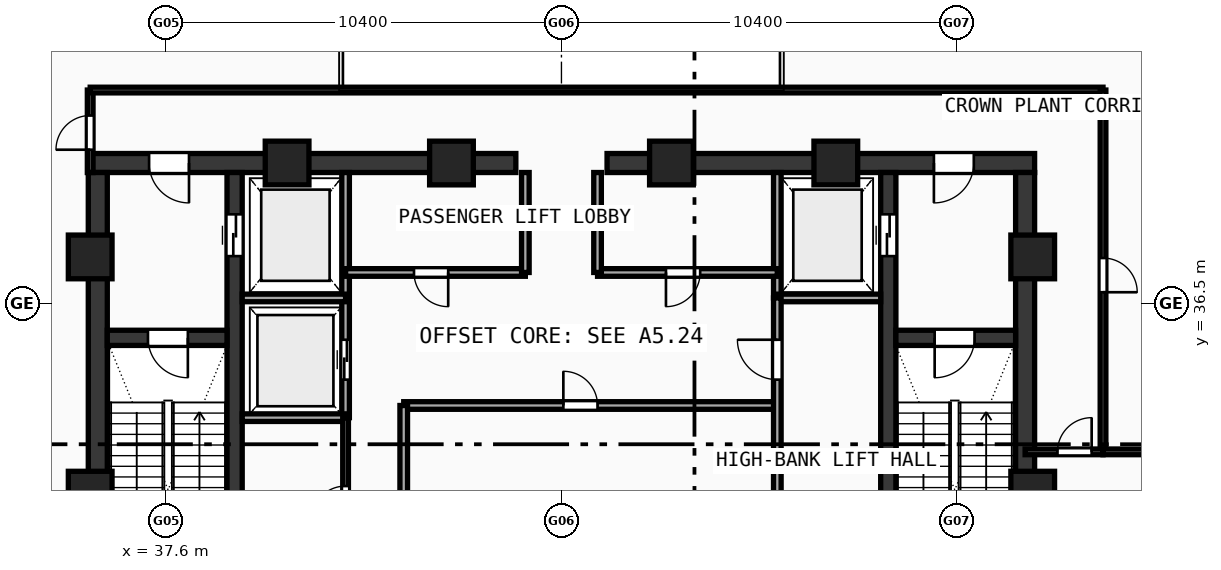
"""IFC4 building model, lengths in metres.
Left out: names, types, materials, properties, quantities, classifications, styles, units other than length and angle.
Written with IfcOpenShell. Run it as: python <this file> out.ifc"""

import sys

from ifc_helpers import new_model, si_unit, direction, frame, frame_2d, origin, origin_with_axes, origin_2d, place, context, subcontext, project, spatial, rectangle, hollow_rectangle, extrude, source, transform, mapped, element, fill, save


model = new_model("IFC4")
c1 = context("Model", 3, precision=1e-05, world=origin(), true_north=direction((0.0, 1.0)))
c2 = subcontext(c1, "Body", "Model", "MODEL_VIEW")
j1 = project(units=[si_unit("LENGTHUNIT", "METRE"), si_unit("PLANEANGLEUNIT", "RADIAN")], contexts=[c1])
p1 = place(None, origin())
s1 = spatial("IfcSite", under=j1, at=p1, CompositionType="ELEMENT")
p2 = place(p1, origin())
s2 = spatial("IfcBuilding", under=s1, at=p2, CompositionType="ELEMENT")
p3 = place(p2, frame((0.0, 0.0, 381.76)))
s3 = spatial("IfcBuildingStorey", under=s2, at=p3, CompositionType="ELEMENT", Elevation=381.76)
p4 = place(p3, frame((35.55, 40.2, 0.0), z_axis=(0.0, 0.0, 1.0), x_axis=(1.0, 0.0, 0.0)))
e1 = element("IfcWall", 1, at=p4, inside=s3, PredefinedType="SHEAR", context=c2, shape_type="SweptSolid", body=[
    extrude(rectangle(XDim=11.25, YDim=0.5, at=frame_2d((5.625, 0.0))), origin(), (0.0, 0.0, 1.0), 4.72),
])
p5 = place(p4, frame((1.6, 0.0, 0.0)))
e2 = element("IfcOpeningElement", 2, at=p5, cuts=e1, PredefinedType="OPENING", context=c2, shape_type="SweptSolid", body=[
    extrude(rectangle(XDim=1.05, YDim=2.1, at=frame_2d((0.525, 1.05))), frame((0.0, 0.26, 0.0), z_axis=(0.0, -1.0, 0.0), x_axis=(1.0, 0.0, 0.0)), (0.0, 0.0, 1.0), 0.52),
])
p6 = place(p3, frame((49.2, 40.2, 0.0), z_axis=(0.0, 0.0, 1.0), x_axis=(1.0, 0.0, 0.0)))
e3 = element("IfcWall", 3, at=p6, inside=s3, PredefinedType="SHEAR", context=c2, shape_type="SweptSolid", body=[
    extrude(rectangle(XDim=11.25, YDim=0.5, at=frame_2d((5.625, 0.0))), origin(), (0.0, 0.0, 1.0), 4.72),
])
p7 = place(p6, frame((8.6, 0.0, 0.0)))
e4 = element("IfcOpeningElement", 4, at=p7, cuts=e3, PredefinedType="OPENING", context=c2, shape_type="SweptSolid", body=[
    extrude(rectangle(XDim=1.05, YDim=2.1, at=frame_2d((0.525, 1.05))), frame((0.0, 0.26, 0.0), z_axis=(0.0, -1.0, 0.0), x_axis=(1.0, 0.0, 0.0)), (0.0, 0.0, 1.0), 0.52),
])
for number, where, z_axis, x_axis in (
    (5, (35.8, 27.75, 0.0), (0.0, 0.0, 1.0), (0.0, 1.0, 0.0)),
    (6, (60.2, 27.75, 0.0), (0.0, 0.0, 1.0), (0.0, 1.0, 0.0)),
):
    element("IfcWall", number, at=place(p3, frame(where, z_axis=z_axis, x_axis=x_axis)), inside=s3, PredefinedType="SHEAR", context=c2, shape_type="SweptSolid", body=[
        extrude(rectangle(XDim=12.2, YDim=0.5, at=frame_2d((6.1, 0.0))), origin(), (0.0, 0.0, 1.0), 4.72),
    ])
p8 = place(p3, frame((39.4, 27.75, 0.0), z_axis=(0.0, 0.0, 1.0), x_axis=(0.0, 1.0, 0.0)))
e7 = element("IfcWall", 7, at=p8, inside=s3, PredefinedType="SHEAR", context=c2, shape_type="SweptSolid", body=[
    extrude(rectangle(XDim=12.2, YDim=0.4, at=frame_2d((6.1, 0.0))), origin(), (0.0, 0.0, 1.0), 4.72),
])
p9 = place(p8, frame((10.0, 0.0, 0.0)))
e8 = element("IfcOpeningElement", 8, at=p9, cuts=e7, PredefinedType="OPENING", context=c2, shape_type="SweptSolid", body=[
    extrude(rectangle(XDim=1.1, YDim=2.1, at=frame_2d((0.55, 1.05))), frame((0.0, 0.21, 0.0), z_axis=(0.0, -1.0, 0.0), x_axis=(1.0, 0.0, 0.0)), (0.0, 0.0, 1.0), 0.42),
])
p10 = place(p3, frame((56.6, 27.75, 0.0), z_axis=(0.0, 0.0, 1.0), x_axis=(0.0, 1.0, 0.0)))
e9 = element("IfcWall", 9, at=p10, inside=s3, PredefinedType="SHEAR", context=c2, shape_type="SweptSolid", body=[
    extrude(rectangle(XDim=12.2, YDim=0.4, at=frame_2d((6.1, 0.0))), origin(), (0.0, 0.0, 1.0), 4.72),
])
p11 = place(p10, frame((10.0, 0.0, 0.0)))
e10 = element("IfcOpeningElement", 10, at=p11, cuts=e9, PredefinedType="OPENING", context=c2, shape_type="SweptSolid", body=[
    extrude(rectangle(XDim=1.1, YDim=2.1, at=frame_2d((0.55, 1.05))), frame((0.0, 0.21, 0.0), z_axis=(0.0, -1.0, 0.0), x_axis=(1.0, 0.0, 0.0)), (0.0, 0.0, 1.0), 0.42),
])
p12 = place(p3, frame((36.05, 35.6, 0.0), z_axis=(0.0, 0.0, 1.0), x_axis=(1.0, 0.0, 0.0)))
e11 = element("IfcWall", 11, at=p12, inside=s3, PredefinedType="SHEAR", context=c2, shape_type="SweptSolid", body=[
    extrude(rectangle(XDim=3.15, YDim=0.4, at=frame_2d((1.575, 0.0))), origin(), (0.0, 0.0, 1.0), 4.72),
])
p13 = place(p12, frame((1.07, 0.0, 0.0)))
e12 = element("IfcOpeningElement", 12, at=p13, cuts=e11, PredefinedType="OPENING", context=c2, shape_type="SweptSolid", body=[
    extrude(rectangle(XDim=1.05, YDim=2.1, at=frame_2d((0.525, 1.05))), frame((0.0, 0.21, 0.0), z_axis=(0.0, -1.0, 0.0), x_axis=(1.0, 0.0, 0.0)), (0.0, 0.0, 1.0), 0.42),
])
p14 = place(p3, frame((56.8, 35.6, 0.0), z_axis=(0.0, 0.0, 1.0), x_axis=(1.0, 0.0, 0.0)))
e13 = element("IfcWall", 13, at=p14, inside=s3, PredefinedType="SHEAR", context=c2, shape_type="SweptSolid", body=[
    extrude(rectangle(XDim=3.15, YDim=0.4, at=frame_2d((1.575, 0.0))), origin(), (0.0, 0.0, 1.0), 4.72),
])
p15 = place(p14, frame((1.02, 0.0, 0.0)))
e14 = element("IfcOpeningElement", 14, at=p15, cuts=e13, PredefinedType="OPENING", context=c2, shape_type="SweptSolid", body=[
    extrude(rectangle(XDim=1.05, YDim=2.1, at=frame_2d((0.525, 1.05))), frame((0.0, 0.21, 0.0), z_axis=(0.0, -1.0, 0.0), x_axis=(1.0, 0.0, 0.0)), (0.0, 0.0, 1.0), 0.42),
])
m1 = source(origin(), c2, "Body", "SweptSolid", [
    extrude(hollow_rectangle(XDim=1.15, YDim=1.15, WallThickness=0.048, at=origin_2d()), origin(), (0.0, 0.0, 1.0), 5.0),
])
for number, where, z_axis, x_axis in (
    (15, (60.4, 31.513, -0.28), (0.0, 0.0, 1.0), (1.0, 0.0, 0.0)),
    (16, (60.4, 37.729, -0.28), (0.0, 0.0, 1.0), (1.0, 0.0, 0.0)),
    (17, (55.219, 40.2, -0.28), (0.0, 0.0, 1.0), (1.0, 0.0, 0.0)),
    (18, (50.894, 40.2, -0.28), (0.0, 0.0, 1.0), (1.0, 0.0, 0.0)),
    (19, (45.106, 40.2, -0.28), (0.0, 0.0, 1.0), (1.0, 0.0, 0.0)),
    (20, (40.781, 40.2, -0.28), (0.0, 0.0, 1.0), (1.0, 0.0, 0.0)),
    (21, (35.6, 37.729, -0.28), (0.0, 0.0, 1.0), (1.0, 0.0, 0.0)),
    (22, (35.6, 31.513, -0.28), (0.0, 0.0, 1.0), (1.0, 0.0, 0.0)),
):
    element("IfcColumn", number, at=place(p3, frame(where, z_axis=z_axis, x_axis=x_axis)), inside=s3, PredefinedType="COLUMN", context=c2, shape_type="MappedRepresentation", body=[
        mapped(m1, transform((0.0, 0.0, 0.0), scale=1.0)),
    ])
p16 = place(p3, frame((42.32, 33.5, 0.0), z_axis=(0.0, 0.0, 1.0), x_axis=(0.0, 1.0, 0.0)))
e23 = element("IfcWall", 23, at=p16, inside=s3, PredefinedType="SOLIDWALL", context=c2, shape_type="SweptSolid", body=[
    extrude(rectangle(XDim=6.45, YDim=0.2, at=frame_2d((3.225, 0.0))), origin(), (0.0, 0.0, 1.0), 4.72),
])
p17 = place(p16, frame((1.0, 0.0, 0.0)))
e24 = element("IfcOpeningElement", 24, at=p17, cuts=e23, PredefinedType="OPENING", context=c2, shape_type="SweptSolid", body=[
    extrude(rectangle(XDim=1.05, YDim=2.1, at=frame_2d((0.525, 1.05))), frame((0.0, 0.11, 0.0), z_axis=(0.0, -1.0, 0.0), x_axis=(1.0, 0.0, 0.0)), (0.0, 0.0, 1.0), 0.22),
])
for number, where, z_axis, x_axis in (
    (25, (39.6, 36.65, 0.0), (0.0, 0.0, 1.0), (1.0, 0.0, 0.0)),
    (26, (39.6, 33.5, 0.0), (0.0, 0.0, 1.0), (1.0, 0.0, 0.0)),
):
    element("IfcWall", number, at=place(p3, frame(where, z_axis=z_axis, x_axis=x_axis)), inside=s3, PredefinedType="SOLIDWALL", context=c2, shape_type="SweptSolid", body=[
        extrude(rectangle(XDim=2.72, YDim=0.2, at=frame_2d((1.36, 0.0))), origin(), (0.0, 0.0, 1.0), 4.72),
    ])
p18 = place(p3, frame((53.68, 36.65, 0.0), z_axis=(0.0, 0.0, 1.0), x_axis=(0.0, 1.0, 0.0)))
e27 = element("IfcWall", 27, at=p18, inside=s3, PredefinedType="SOLIDWALL", context=c2, shape_type="SweptSolid", body=[
    extrude(rectangle(XDim=3.3, YDim=0.2, at=frame_2d((1.65, 0.0))), origin(), (0.0, 0.0, 1.0), 4.72),
])
p19 = place(p3, frame((53.68, 36.65, 0.0), z_axis=(0.0, 0.0, 1.0), x_axis=(1.0, 0.0, 0.0)))
e28 = element("IfcWall", 28, at=p19, inside=s3, PredefinedType="SOLIDWALL", context=c2, shape_type="SweptSolid", body=[
    extrude(rectangle(XDim=2.72, YDim=0.2, at=frame_2d((1.36, 0.0))), origin(), (0.0, 0.0, 1.0), 4.72),
])
p20 = place(p3, frame((42.32, 37.32, 0.0), z_axis=(0.0, 0.0, 1.0), x_axis=(1.0, 0.0, 0.0)))
e29 = element("IfcWall", 29, at=p20, inside=s3, PredefinedType="SOLIDWALL", context=c2, shape_type="SweptSolid", body=[
    extrude(rectangle(XDim=4.73, YDim=0.2, at=frame_2d((2.365, 0.0))), origin(), (0.0, 0.0, 1.0), 4.72),
])
p21 = place(p20, frame((1.8, 0.0, 0.0)))
e30 = element("IfcOpeningElement", 30, at=p21, cuts=e29, PredefinedType="OPENING", context=c2, shape_type="SweptSolid", body=[
    extrude(rectangle(XDim=0.9, YDim=2.1, at=frame_2d((0.45, 1.05))), frame((0.0, 0.11, 0.0), z_axis=(0.0, -1.0, 0.0), x_axis=(1.0, 0.0, 0.0)), (0.0, 0.0, 1.0), 0.22),
])
p22 = place(p3, frame((48.95, 37.32, 0.0), z_axis=(0.0, 0.0, 1.0), x_axis=(1.0, 0.0, 0.0)))
e31 = element("IfcWall", 31, at=p22, inside=s3, PredefinedType="SOLIDWALL", context=c2, shape_type="SweptSolid", body=[
    extrude(rectangle(XDim=4.73, YDim=0.2, at=frame_2d((2.365, 0.0))), origin(), (0.0, 0.0, 1.0), 4.72),
])
p23 = place(p22, frame((1.8, 0.0, 0.0)))
e32 = element("IfcOpeningElement", 32, at=p23, cuts=e31, PredefinedType="OPENING", context=c2, shape_type="SweptSolid", body=[
    extrude(rectangle(XDim=0.9, YDim=2.1, at=frame_2d((0.45, 1.05))), frame((0.0, 0.11, 0.0), z_axis=(0.0, -1.0, 0.0), x_axis=(1.0, 0.0, 0.0)), (0.0, 0.0, 1.0), 0.22),
])
for number, where, z_axis, x_axis in (
    (33, (47.05, 37.32, 0.0), (0.0, 0.0, 1.0), (0.0, 1.0, 0.0)),
    (34, (48.95, 37.32, 0.0), (0.0, 0.0, 1.0), (0.0, 1.0, 0.0)),
):
    element("IfcWall", number, at=place(p3, frame(where, z_axis=z_axis, x_axis=x_axis)), inside=s3, PredefinedType="SOLIDWALL", context=c2, shape_type="SweptSolid", body=[
        extrude(rectangle(XDim=2.63, YDim=0.2, at=frame_2d((1.315, 0.0))), origin(), (0.0, 0.0, 1.0), 4.72),
    ])
p24 = place(p3, frame((43.85, 33.82, 0.0), z_axis=(0.0, 0.0, 1.0), x_axis=(1.0, 0.0, 0.0)))
e35 = element("IfcWall", 35, at=p24, inside=s3, PredefinedType="SOLIDWALL", context=c2, shape_type="SweptSolid", body=[
    extrude(rectangle(XDim=9.83, YDim=0.2, at=frame_2d((4.915, 0.0))), origin(), (0.0, 0.0, 1.0), 4.72),
])
p25 = place(p24, frame((4.2, 0.0, 0.0)))
e36 = element("IfcOpeningElement", 36, at=p25, cuts=e35, PredefinedType="OPENING", context=c2, shape_type="SweptSolid", body=[
    extrude(rectangle(XDim=0.9, YDim=2.1, at=frame_2d((0.45, 1.05))), frame((0.0, 0.11, 0.0), z_axis=(0.0, -1.0, 0.0), x_axis=(1.0, 0.0, 0.0)), (0.0, 0.0, 1.0), 0.22),
])
p26 = place(p3, frame((43.85, 27.6, 0.0), z_axis=(0.0, 0.0, 1.0), x_axis=(0.0, 1.0, 0.0)))
e37 = element("IfcWall", 37, at=p26, inside=s3, PredefinedType="SOLIDWALL", context=c2, shape_type="SweptSolid", body=[
    extrude(rectangle(XDim=6.22, YDim=0.2, at=frame_2d((3.11, 0.0))), origin(), (0.0, 0.0, 1.0), 4.72),
])
p27 = place(p26, frame((2.25, 0.0, 0.0)))
e38 = element("IfcOpeningElement", 38, at=p27, cuts=e37, PredefinedType="OPENING", context=c2, shape_type="SweptSolid", body=[
    extrude(rectangle(XDim=1.05, YDim=2.1, at=frame_2d((0.525, 1.05))), frame((0.0, 0.11, 0.0), z_axis=(0.0, -1.0, 0.0), x_axis=(1.0, 0.0, 0.0)), (0.0, 0.0, 1.0), 0.22),
])
p28 = place(p3, frame((53.68, 27.6, 0.0), z_axis=(0.0, 0.0, 1.0), x_axis=(0.0, 1.0, 0.0)))
e39 = element("IfcWall", 39, at=p28, inside=s3, PredefinedType="SOLIDWALL", context=c2, shape_type="SweptSolid", body=[
    extrude(rectangle(XDim=9.05, YDim=0.2, at=frame_2d((4.525, 0.0))), origin(), (0.0, 0.0, 1.0), 4.72),
])
p29 = place(p28, frame((6.9, 0.0, 0.0)))
e40 = element("IfcOpeningElement", 40, at=p29, cuts=e39, PredefinedType="OPENING", context=c2, shape_type="SweptSolid", body=[
    extrude(rectangle(XDim=1.05, YDim=2.1, at=frame_2d((0.525, 1.05))), frame((0.0, 0.11, 0.0), z_axis=(0.0, -1.0, 0.0), x_axis=(1.0, 0.0, 0.0)), (0.0, 0.0, 1.0), 0.22),
])
p30 = place(p3, frame((42.32, 27.6, 0.0), z_axis=(0.0, 0.0, 1.0), x_axis=(0.0, 1.0, 0.0)))
e41 = element("IfcWall", 41, at=p30, inside=s3, PredefinedType="PARTITIONING", context=c2, shape_type="SweptSolid", body=[
    extrude(rectangle(XDim=5.9, YDim=0.15, at=frame_2d((2.95, 0.0))), origin(), (0.0, 0.0, 1.0), 4.72),
])
p31 = place(p30, frame((3.2, 0.0, 0.0)))
e42 = element("IfcOpeningElement", 42, at=p31, cuts=e41, PredefinedType="OPENING", context=c2, shape_type="SweptSolid", body=[
    extrude(rectangle(XDim=0.9, YDim=2.1, at=frame_2d((0.45, 1.05))), frame((0.0, 0.085, 0.0), z_axis=(0.0, -1.0, 0.0), x_axis=(1.0, 0.0, 0.0)), (0.0, 0.0, 1.0), 0.17),
])
p32 = place(p3, frame((35.6, 39.95, 0.0), z_axis=(0.0, 0.0, 1.0), x_axis=(0.0, 1.0, 0.0)))
e43 = element("IfcWall", 43, at=p32, inside=s3, PredefinedType="PARTITIONING", context=c2, shape_type="SweptSolid", body=[
    extrude(rectangle(XDim=2.17, YDim=0.15, at=frame_2d((1.085, 0.0))), origin(), (0.0, 0.0, 1.0), 4.37),
])
p33 = place(p32, frame((0.6, 0.0, 0.0)))
e44 = element("IfcOpeningElement", 44, at=p33, cuts=e43, PredefinedType="OPENING", context=c2, shape_type="SweptSolid", body=[
    extrude(rectangle(XDim=0.9, YDim=2.1, at=frame_2d((0.45, 1.05))), frame((0.0, 0.085, 0.0), z_axis=(0.0, -1.0, 0.0), x_axis=(1.0, 0.0, 0.0)), (0.0, 0.0, 1.0), 0.17),
])
p34 = place(p3, frame((35.6, 42.12, 0.0), z_axis=(0.0, 0.0, 1.0), x_axis=(1.0, 0.0, 0.0)))
e45 = element("IfcWall", 45, at=p34, inside=s3, PredefinedType="PARTITIONING", context=c2, shape_type="SweptSolid", body=[
    extrude(rectangle(XDim=26.65, YDim=0.15, at=frame_2d((13.325, 0.0))), origin(), (0.0, 0.0, 1.0), 4.12),
])
p35 = place(p3, frame((62.25, 32.6, 0.0), z_axis=(0.0, 0.0, 1.0), x_axis=(0.0, 1.0, 0.0)))
e46 = element("IfcWall", 46, at=p35, inside=s3, PredefinedType="PARTITIONING", context=c2, shape_type="SweptSolid", body=[
    extrude(rectangle(XDim=9.52, YDim=0.15, at=frame_2d((4.76, 0.0))), origin(), (0.0, 0.0, 1.0), 4.12),
])
p36 = place(p35, frame((4.2, 0.0, 0.0)))
e47 = element("IfcOpeningElement", 47, at=p36, cuts=e46, PredefinedType="OPENING", context=c2, shape_type="SweptSolid", body=[
    extrude(rectangle(XDim=0.9, YDim=2.1, at=frame_2d((0.45, 1.05))), frame((0.0, 0.085, 0.0), z_axis=(0.0, -1.0, 0.0), x_axis=(1.0, 0.0, 0.0)), (0.0, 0.0, 1.0), 0.17),
])
p37 = place(p3, frame((60.2, 32.6, 0.0), z_axis=(0.0, 0.0, 1.0), x_axis=(1.0, 0.0, 0.0)))
e48 = element("IfcWall", 48, at=p37, inside=s3, PredefinedType="PARTITIONING", context=c2, shape_type="SweptSolid", body=[
    extrude(rectangle(XDim=2.05, YDim=0.15, at=frame_2d((1.025, 0.0))), origin(), (0.0, 0.0, 1.0), 4.72),
])
p38 = place(p37, frame((0.851, 0.0, 0.0)))
e49 = element("IfcOpeningElement", 49, at=p38, cuts=e48, PredefinedType="OPENING", context=c2, shape_type="SweptSolid", body=[
    extrude(rectangle(XDim=0.9, YDim=2.1, at=frame_2d((0.45, 1.05))), frame((0.0, 0.085, 0.0), z_axis=(0.0, -1.0, 0.0), x_axis=(1.0, 0.0, 0.0)), (0.0, 0.0, 1.0), 0.17),
])
p39 = place(p3, frame((62.25, 32.6, 0.0), z_axis=(0.0, 0.0, 1.0), x_axis=(1.0, 0.0, 0.0)))
e50 = element("IfcWall", 50, at=p39, inside=s3, PredefinedType="PARTITIONING", context=c2, shape_type="SweptSolid", body=[
    extrude(rectangle(XDim=9.97, YDim=0.15, at=frame_2d((4.985, 0.0))), origin(), (0.0, 0.0, 1.0), 4.12),
])
m2 = source(origin(), c2, "Body", "SweptSolid", [
    extrude(rectangle(XDim=1.05, YDim=2.1, at=frame_2d((0.525, 1.05))), frame((0.0, 0.025, 0.0), z_axis=(0.0, -1.0, 0.0), x_axis=(1.0, 0.0, 0.0)), (0.0, 0.0, 1.0), 0.05),
])
p40 = place(p13, frame((1.05, 0.0, 0.0), z_axis=(0.0, 0.0, 1.0), x_axis=(-1.0, 0.0, 0.0)))
e51 = element("IfcDoor", 51, at=p40, inside=s3, OperationType="SINGLE_SWING_LEFT", PredefinedType="DOOR", context=c2, shape_type="MappedRepresentation", body=[
    mapped(m2, transform((0.0, 0.0, 0.0), scale=1.0)),
])
fill(e12, e51)
p41 = place(p15, frame((1.05, 0.0, 0.0), z_axis=(0.0, 0.0, 1.0), x_axis=(-1.0, 0.0, 0.0)))
e52 = element("IfcDoor", 52, at=p41, inside=s3, OperationType="SINGLE_SWING_RIGHT", PredefinedType="DOOR", context=c2, shape_type="MappedRepresentation", body=[
    mapped(m2, transform((0.0, 0.0, 0.0), scale=1.0)),
])
fill(e14, e52)
p42 = place(p5, frame((1.05, 0.0, 0.0), z_axis=(0.0, 0.0, 1.0), x_axis=(-1.0, 0.0, 0.0)))
e53 = element("IfcDoor", 53, at=p42, inside=s3, OperationType="SINGLE_SWING_LEFT", PredefinedType="DOOR", context=c2, shape_type="MappedRepresentation", body=[
    mapped(m2, transform((0.0, 0.0, 0.0), scale=1.0)),
])
fill(e2, e53)
p43 = place(p7, frame((1.05, 0.0, 0.0), z_axis=(0.0, 0.0, 1.0), x_axis=(-1.0, 0.0, 0.0)))
e54 = element("IfcDoor", 54, at=p43, inside=s3, OperationType="SINGLE_SWING_RIGHT", PredefinedType="DOOR", context=c2, shape_type="MappedRepresentation", body=[
    mapped(m2, transform((0.0, 0.0, 0.0), scale=1.0)),
])
fill(e4, e54)
m3 = source(origin(), c2, "Body", "SweptSolid", [
    extrude(rectangle(XDim=1.1, YDim=2.1, at=frame_2d((0.55, 1.05))), frame((0.0, 0.025, 0.0), z_axis=(0.0, -1.0, 0.0), x_axis=(1.0, 0.0, 0.0)), (0.0, 0.0, 1.0), 0.05),
])
p44 = place(p9, frame((1.1, 0.0, 0.0), z_axis=(0.0, 0.0, 1.0), x_axis=(-1.0, 0.0, 0.0)))
e55 = element("IfcDoor", 55, at=p44, inside=s3, OperationType="DOUBLE_DOOR_SLIDING", PredefinedType="DOOR", context=c2, shape_type="MappedRepresentation", body=[
    mapped(m3, transform((0.0, 0.0, 0.0), scale=1.0)),
])
fill(e8, e55)
p45 = place(p11, origin_with_axes())
e56 = element("IfcDoor", 56, at=p45, inside=s3, OperationType="DOUBLE_DOOR_SLIDING", PredefinedType="DOOR", context=c2, shape_type="MappedRepresentation", body=[
    mapped(m3, transform((0.0, 0.0, 0.0), scale=1.0)),
])
fill(e10, e56)
p46 = place(p17, origin_with_axes())
e57 = element("IfcDoor", 57, at=p46, inside=s3, OperationType="DOUBLE_DOOR_SLIDING", PredefinedType="DOOR", context=c2, shape_type="MappedRepresentation", body=[
    mapped(m2, transform((0.0, 0.0, 0.0), scale=1.0)),
])
fill(e24, e57)
m4 = source(origin(), c2, "Body", "SweptSolid", [
    extrude(rectangle(XDim=0.9, YDim=2.1, at=frame_2d((0.45, 1.05))), frame((0.0, 0.025, 0.0), z_axis=(0.0, -1.0, 0.0), x_axis=(1.0, 0.0, 0.0)), (0.0, 0.0, 1.0), 0.05),
])
p47 = place(p21, frame((0.9, 0.0, 0.0), z_axis=(0.0, 0.0, 1.0), x_axis=(-1.0, 0.0, 0.0)))
e58 = element("IfcDoor", 58, at=p47, inside=s3, OperationType="SINGLE_SWING_LEFT", PredefinedType="DOOR", context=c2, shape_type="MappedRepresentation", body=[
    mapped(m4, transform((0.0, 0.0, 0.0), scale=1.0)),
])
fill(e30, e58)
p48 = place(p23, frame((0.9, 0.0, 0.0), z_axis=(0.0, 0.0, 1.0), x_axis=(-1.0, 0.0, 0.0)))
e59 = element("IfcDoor", 59, at=p48, inside=s3, OperationType="SINGLE_SWING_RIGHT", PredefinedType="DOOR", context=c2, shape_type="MappedRepresentation", body=[
    mapped(m4, transform((0.0, 0.0, 0.0), scale=1.0)),
])
fill(e32, e59)
p49 = place(p25, origin_with_axes())
e60 = element("IfcDoor", 60, at=p49, inside=s3, OperationType="SINGLE_SWING_LEFT", PredefinedType="DOOR", context=c2, shape_type="MappedRepresentation", body=[
    mapped(m4, transform((0.0, 0.0, 0.0), scale=1.0)),
])
fill(e36, e60)
p50 = place(p29, origin_with_axes())
e61 = element("IfcDoor", 61, at=p50, inside=s3, OperationType="SINGLE_SWING_RIGHT", PredefinedType="DOOR", context=c2, shape_type="MappedRepresentation", body=[
    mapped(m2, transform((0.0, 0.0, 0.0), scale=1.0)),
])
fill(e40, e61)
p51 = place(p31, origin_with_axes())
e62 = element("IfcDoor", 62, at=p51, inside=s3, OperationType="SINGLE_SWING_LEFT", PredefinedType="DOOR", context=c2, shape_type="MappedRepresentation", body=[
    mapped(m4, transform((0.0, 0.0, 0.0), scale=1.0)),
])
fill(e42, e62)
p52 = place(p33, origin_with_axes())
e63 = element("IfcDoor", 63, at=p52, inside=s3, OperationType="SINGLE_SWING_LEFT", PredefinedType="DOOR", context=c2, shape_type="MappedRepresentation", body=[
    mapped(m4, transform((0.0, 0.0, 0.0), scale=1.0)),
])
fill(e44, e63)
p53 = place(p36, frame((0.9, 0.0, 0.0), z_axis=(0.0, 0.0, 1.0), x_axis=(-1.0, 0.0, 0.0)))
e64 = element("IfcDoor", 64, at=p53, inside=s3, OperationType="SINGLE_SWING_RIGHT", PredefinedType="DOOR", context=c2, shape_type="MappedRepresentation", body=[
    mapped(m4, transform((0.0, 0.0, 0.0), scale=1.0)),
])
fill(e47, e64)
p54 = place(p38, origin_with_axes())
e65 = element("IfcDoor", 65, at=p54, inside=s3, OperationType="SINGLE_SWING_RIGHT", PredefinedType="DOOR", context=c2, shape_type="MappedRepresentation", body=[
    mapped(m4, transform((0.0, 0.0, 0.0), scale=1.0)),
])
fill(e49, e65)
save(model, sys.argv[1])
